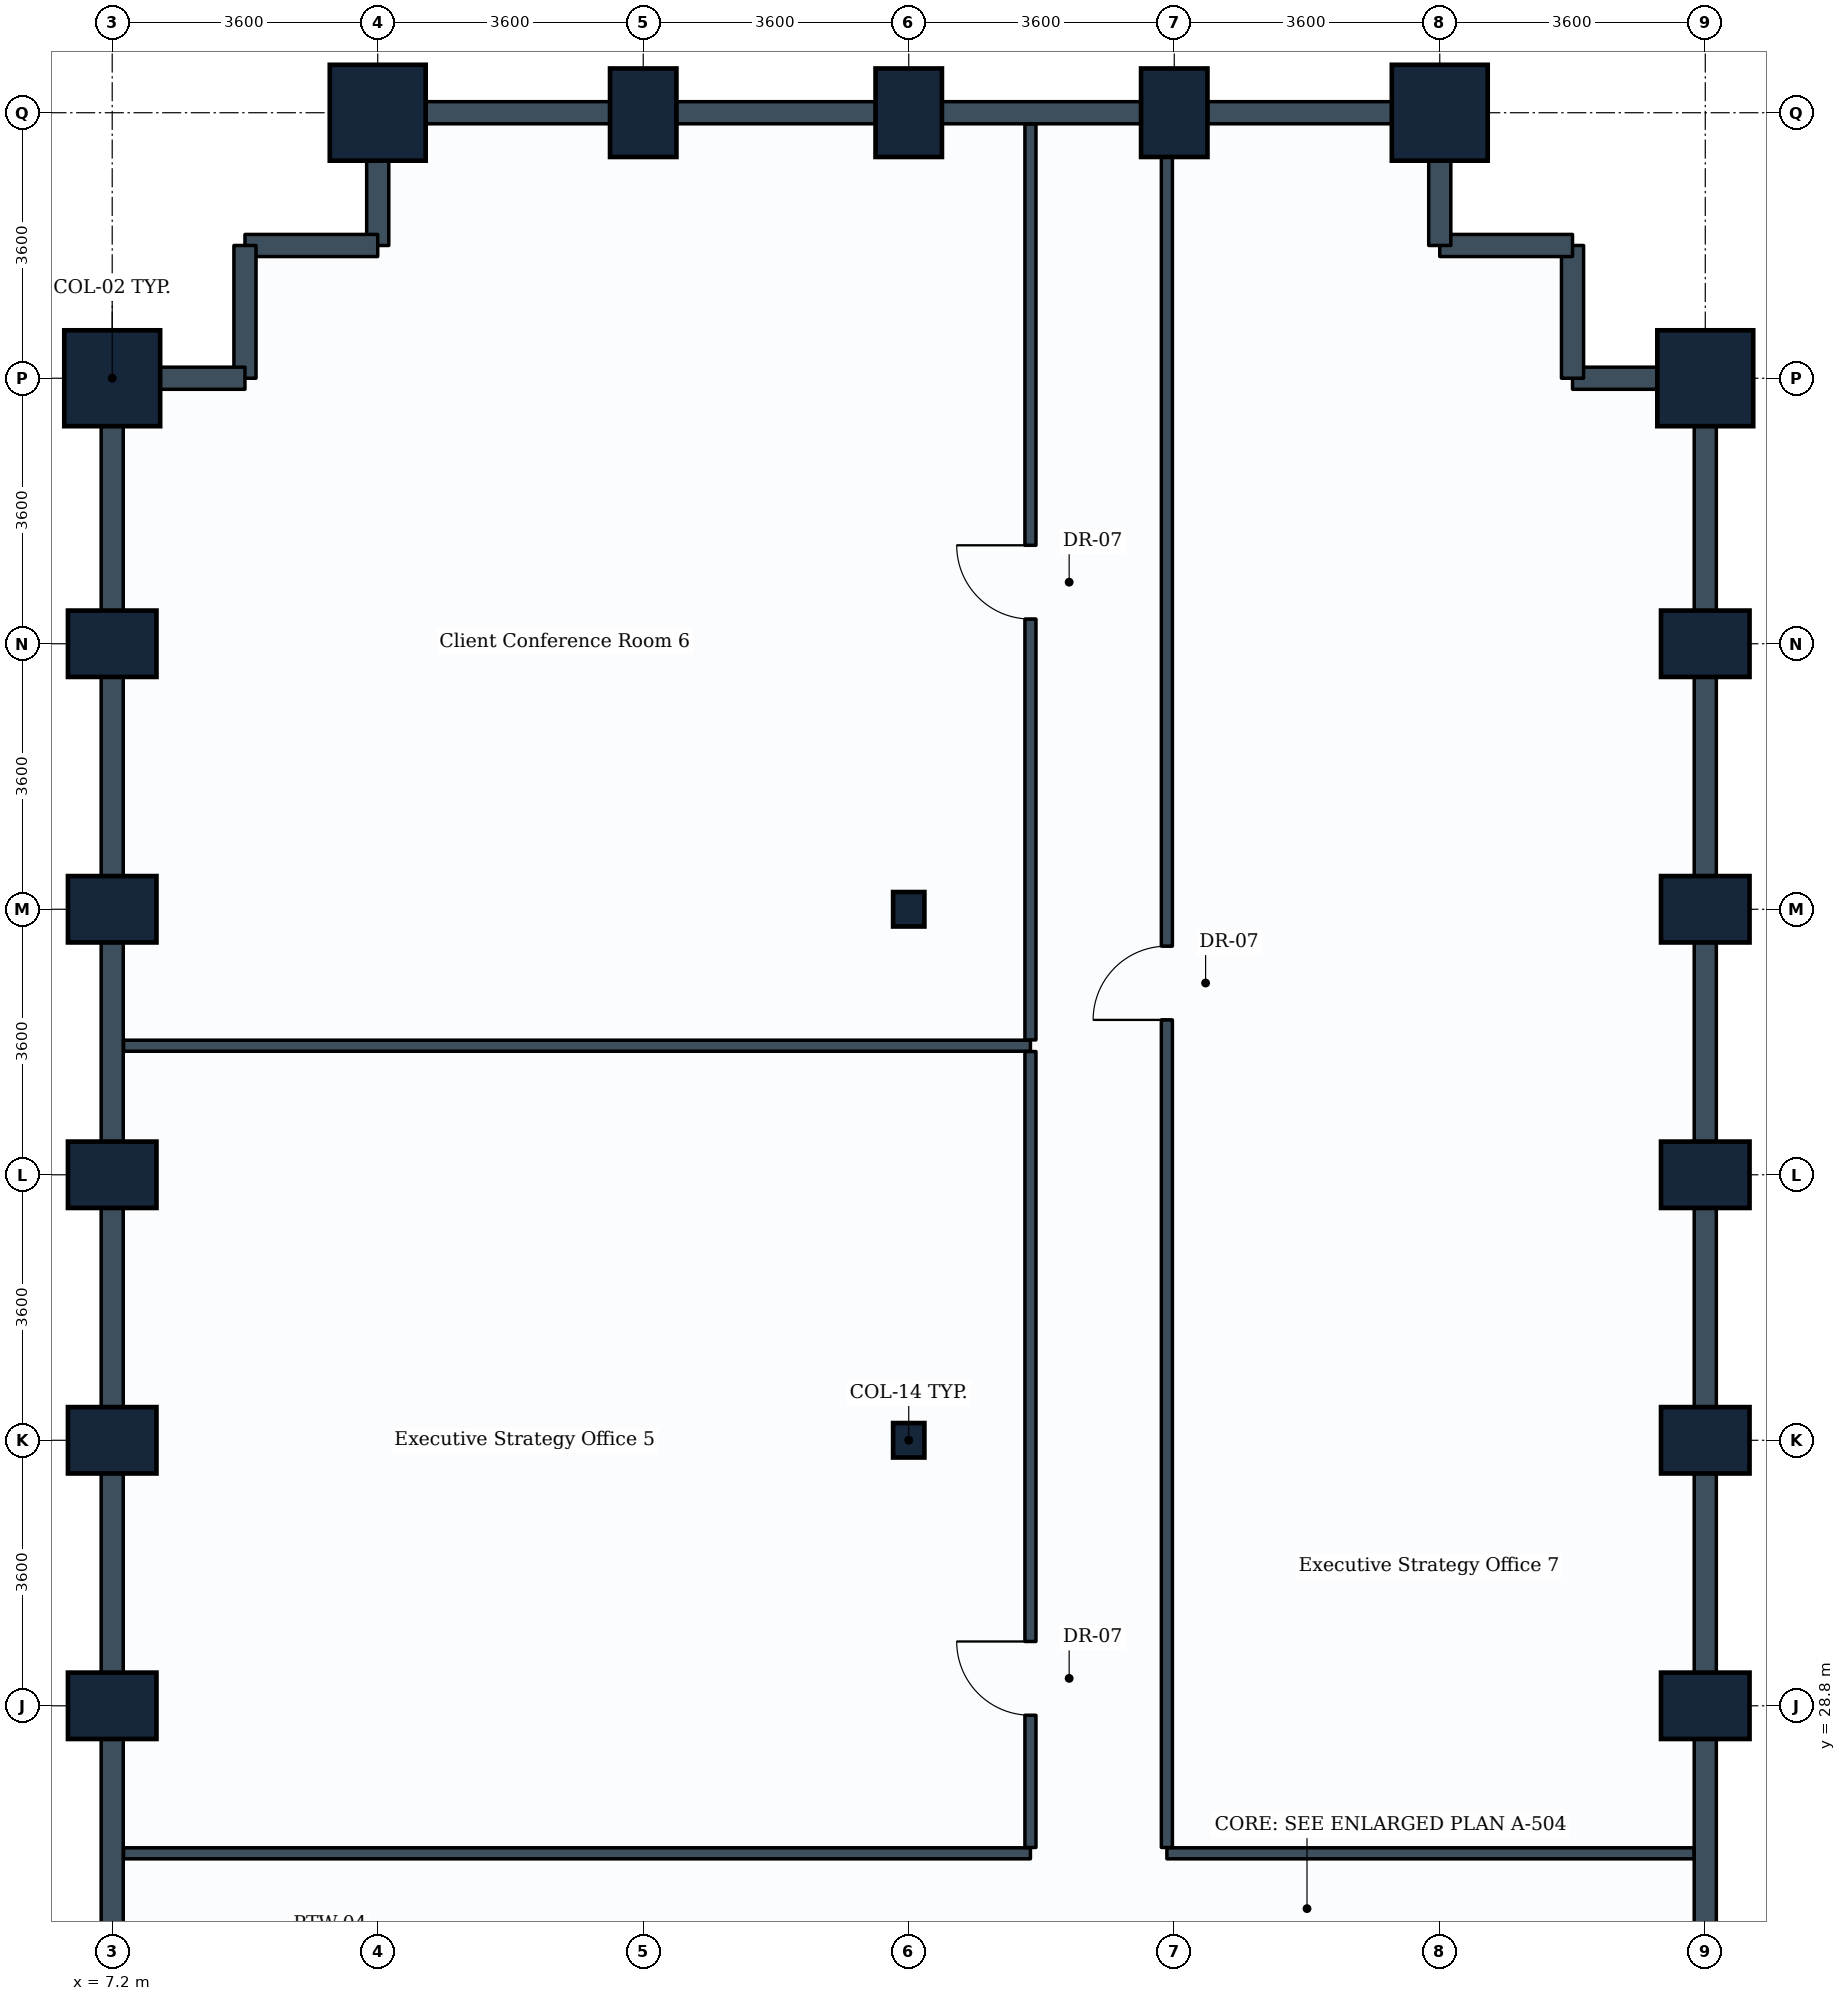
"""IFC4 building model, lengths in metres.
Left out: names, types, materials, properties, quantities, classifications, styles, units other than length and angle.
Written with IfcOpenShell. Run it as: python <this file> out.ifc"""

import sys

from ifc_helpers import new_model, si_unit, direction, frame, frame_2d, origin, origin_2d, place, context, subcontext, project, spatial, rectangle, i_section, extrude, element, fill, save


model = new_model("IFC4")
c1 = context("Model", 3, precision=1e-05, world=origin(), true_north=direction((0.0, 1.0)))
c2 = subcontext(c1, "Body", "Model", "MODEL_VIEW")
j1 = project(units=[si_unit("LENGTHUNIT", "METRE"), si_unit("PLANEANGLEUNIT", "RADIAN")], contexts=[c1])
p1 = place(None, origin())
s1 = spatial("IfcSite", under=j1, at=p1, CompositionType="ELEMENT")
p2 = place(p1, origin())
s2 = spatial("IfcBuilding", under=s1, at=p2, CompositionType="ELEMENT")
p3 = place(p2, frame((0.0, 0.0, 27.9)))
s3 = spatial("IfcBuildingStorey", under=s2, at=p3, CompositionType="ELEMENT", Elevation=27.9)
for number, where, z_axis, x_axis in (
    (1, (7.2, 28.8, 0.0), (0.0, 0.0, 1.0), (0.0, 1.0, 0.0)),
    (2, (7.2, 32.4, 0.0), (0.0, 0.0, 1.0), (0.0, 1.0, 0.0)),
    (3, (7.2, 36.0, 0.0), (0.0, 0.0, 1.0), (0.0, 1.0, 0.0)),
    (4, (7.2, 39.6, 0.0), (0.0, 0.0, 1.0), (0.0, 1.0, 0.0)),
    (5, (7.2, 43.2, 0.0), (0.0, 0.0, 1.0), (0.0, 1.0, 0.0)),
):
    element("IfcColumn", number, at=place(p3, frame(where, z_axis=z_axis, x_axis=x_axis)), inside=s3, PredefinedType="COLUMN", context=c2, shape_type="SweptSolid", body=[
        extrude(rectangle(XDim=0.9, YDim=1.2, at=origin_2d()), origin(), (0.0, 0.0, 1.0), 3.9),
    ])
for number, where, z_axis, x_axis in (
    (6, (7.2, 46.8, 0.0), (0.0, 0.0, 1.0), (0.0, 1.0, 0.0)),
    (7, (10.8, 50.4, 0.0), (0.0, 0.0, 1.0), (1.0, 0.0, 0.0)),
):
    element("IfcColumn", number, at=place(p3, frame(where, z_axis=z_axis, x_axis=x_axis)), inside=s3, PredefinedType="COLUMN", context=c2, shape_type="SweptSolid", body=[
        extrude(rectangle(XDim=1.3, YDim=1.3, at=origin_2d()), origin(), (0.0, 0.0, 1.0), 3.9),
    ])
p4 = place(p3, frame((14.4, 50.4, 0.0), z_axis=(0.0, 0.0, 1.0), x_axis=(1.0, 0.0, 0.0)))
e8 = element("IfcColumn", 8, at=p4, inside=s3, PredefinedType="COLUMN", context=c2, shape_type="SweptSolid", body=[
    extrude(rectangle(XDim=0.9, YDim=1.2, at=origin_2d()), origin(), (0.0, 0.0, 1.0), 3.9),
])
for number, where, z_axis, x_axis in (
    (9, (18.0, 32.4, 0.0), (0.0, 0.0, 1.0), (1.0, 0.0, 0.0)),
    (10, (18.0, 39.6, 0.0), (0.0, 0.0, 1.0), (1.0, 0.0, 0.0)),
):
    element("IfcColumn", number, at=place(p3, frame(where, z_axis=z_axis, x_axis=x_axis)), inside=s3, PredefinedType="COLUMN", context=c2, shape_type="SweptSolid", body=[
        extrude(i_section(OverallWidth=0.424, OverallDepth=0.467, WebThickness=0.033, FlangeThickness=0.053, FilletRadius=0.015, at=origin_2d()), origin(), (0.0, 0.0, 1.0), 3.9),
    ])
for number, where, z_axis, x_axis in (
    (11, (18.0, 50.4, 0.0), (0.0, 0.0, 1.0), (1.0, 0.0, 0.0)),
    (12, (21.6, 50.4, 0.0), (0.0, 0.0, 1.0), (1.0, 0.0, 0.0)),
):
    element("IfcColumn", number, at=place(p3, frame(where, z_axis=z_axis, x_axis=x_axis)), inside=s3, PredefinedType="COLUMN", context=c2, shape_type="SweptSolid", body=[
        extrude(rectangle(XDim=0.9, YDim=1.2, at=origin_2d()), origin(), (0.0, 0.0, 1.0), 3.9),
    ])
p5 = place(p3, frame((25.2, 50.4, 0.0), z_axis=(0.0, 0.0, 1.0), x_axis=(1.0, 0.0, 0.0)))
e13 = element("IfcColumn", 13, at=p5, inside=s3, PredefinedType="COLUMN", context=c2, shape_type="SweptSolid", body=[
    extrude(rectangle(XDim=1.3, YDim=1.3, at=origin_2d()), origin(), (0.0, 0.0, 1.0), 3.9),
])
for number, where, z_axis, x_axis in (
    (14, (28.8, 28.8, 0.0), (0.0, 0.0, 1.0), (0.0, 1.0, 0.0)),
    (15, (28.8, 32.4, 0.0), (0.0, 0.0, 1.0), (0.0, 1.0, 0.0)),
    (16, (28.8, 36.0, 0.0), (0.0, 0.0, 1.0), (0.0, 1.0, 0.0)),
    (17, (28.8, 39.6, 0.0), (0.0, 0.0, 1.0), (0.0, 1.0, 0.0)),
    (18, (28.8, 43.2, 0.0), (0.0, 0.0, 1.0), (0.0, 1.0, 0.0)),
):
    element("IfcColumn", number, at=place(p3, frame(where, z_axis=z_axis, x_axis=x_axis)), inside=s3, PredefinedType="COLUMN", context=c2, shape_type="SweptSolid", body=[
        extrude(rectangle(XDim=0.9, YDim=1.2, at=origin_2d()), origin(), (0.0, 0.0, 1.0), 3.9),
    ])
p6 = place(p3, frame((28.8, 46.8, 0.0), z_axis=(0.0, 0.0, 1.0), x_axis=(0.0, 1.0, 0.0)))
e19 = element("IfcColumn", 19, at=p6, inside=s3, PredefinedType="COLUMN", context=c2, shape_type="SweptSolid", body=[
    extrude(rectangle(XDim=1.3, YDim=1.3, at=origin_2d()), origin(), (0.0, 0.0, 1.0), 3.9),
])
p7 = place(p3, frame((28.8, 25.2, 0.0), z_axis=(0.0, 0.0, 1.0), x_axis=(0.0, 1.0, 0.0)))
e20 = element("IfcWall", 20, at=p7, inside=s3, PredefinedType="STANDARD", context=c2, shape_type="SweptSolid", body=[
    extrude(rectangle(XDim=3.6, YDim=0.3, at=frame_2d((1.8, 0.0))), origin(), (0.0, 0.0, 1.0), 3.14),
])
p8 = place(p3, frame((28.8, 28.8, 0.0), z_axis=(0.0, 0.0, 1.0), x_axis=(0.0, 1.0, 0.0)))
e21 = element("IfcWall", 21, at=p8, inside=s3, PredefinedType="STANDARD", context=c2, shape_type="SweptSolid", body=[
    extrude(rectangle(XDim=3.6, YDim=0.3, at=frame_2d((1.8, 0.0))), origin(), (0.0, 0.0, 1.0), 2.93),
])
for number, where, z_axis, x_axis in (
    (22, (28.8, 32.4, 0.0), (0.0, 0.0, 1.0), (0.0, 1.0, 0.0)),
    (23, (28.8, 36.0, 0.0), (0.0, 0.0, 1.0), (0.0, 1.0, 0.0)),
):
    element("IfcWall", number, at=place(p3, frame(where, z_axis=z_axis, x_axis=x_axis)), inside=s3, PredefinedType="STANDARD", context=c2, shape_type="SweptSolid", body=[
        extrude(rectangle(XDim=3.6, YDim=0.3, at=frame_2d((1.8, 0.0))), origin(), (0.0, 0.0, 1.0), 2.93),
    ])
p9 = place(p3, frame((28.8, 39.6, 0.0), z_axis=(0.0, 0.0, 1.0), x_axis=(0.0, 1.0, 0.0)))
e24 = element("IfcWall", 24, at=p9, inside=s3, PredefinedType="STANDARD", context=c2, shape_type="SweptSolid", body=[
    extrude(rectangle(XDim=3.6, YDim=0.3, at=frame_2d((1.8, 0.0))), origin(), (0.0, 0.0, 1.0), 2.93),
])
p10 = place(p3, frame((28.8, 43.2, 0.0), z_axis=(0.0, 0.0, 1.0), x_axis=(0.0, 1.0, 0.0)))
e25 = element("IfcWall", 25, at=p10, inside=s3, PredefinedType="STANDARD", context=c2, shape_type="SweptSolid", body=[
    extrude(rectangle(XDim=3.6, YDim=0.3, at=frame_2d((1.8, 0.0))), origin(), (0.0, 0.0, 1.0), 2.93),
])
p11 = place(p3, frame((27.0, 46.8, 0.0), z_axis=(0.0, 0.0, 1.0), x_axis=(1.0, 0.0, 0.0)))
e26 = element("IfcWall", 26, at=p11, inside=s3, PredefinedType="STANDARD", context=c2, shape_type="SweptSolid", body=[
    extrude(rectangle(XDim=1.8, YDim=0.3, at=frame_2d((0.9, 0.0))), origin(), (0.0, 0.0, 1.0), 2.93),
])
for number, where, z_axis, x_axis in (
    (27, (27.0, 46.8, 0.0), (0.0, 0.0, 1.0), (0.0, 1.0, 0.0)),
    (28, (25.2, 48.6, 0.0), (0.0, 0.0, 1.0), (1.0, 0.0, 0.0)),
):
    element("IfcWall", number, at=place(p3, frame(where, z_axis=z_axis, x_axis=x_axis)), inside=s3, PredefinedType="STANDARD", context=c2, shape_type="SweptSolid", body=[
        extrude(rectangle(XDim=1.8, YDim=0.3, at=frame_2d((0.9, 0.0))), origin(), (0.0, 0.0, 1.0), 3.635),
    ])
p12 = place(p3, frame((25.2, 48.6, 0.0), z_axis=(0.0, 0.0, 1.0), x_axis=(0.0, 1.0, 0.0)))
e29 = element("IfcWall", 29, at=p12, inside=s3, PredefinedType="STANDARD", context=c2, shape_type="SweptSolid", body=[
    extrude(rectangle(XDim=1.8, YDim=0.3, at=frame_2d((0.9, 0.0))), origin(), (0.0, 0.0, 1.0), 2.93),
])
p13 = place(p3, frame((21.6, 50.4, 0.0), z_axis=(0.0, 0.0, 1.0), x_axis=(1.0, 0.0, 0.0)))
e30 = element("IfcWall", 30, at=p13, inside=s3, PredefinedType="STANDARD", context=c2, shape_type="SweptSolid", body=[
    extrude(rectangle(XDim=3.6, YDim=0.3, at=frame_2d((1.8, 0.0))), origin(), (0.0, 0.0, 1.0), 2.93),
])
for number, where, z_axis, x_axis in (
    (31, (18.0, 50.4, 0.0), (0.0, 0.0, 1.0), (1.0, 0.0, 0.0)),
    (32, (14.4, 50.4, 0.0), (0.0, 0.0, 1.0), (1.0, 0.0, 0.0)),
):
    element("IfcWall", number, at=place(p3, frame(where, z_axis=z_axis, x_axis=x_axis)), inside=s3, PredefinedType="STANDARD", context=c2, shape_type="SweptSolid", body=[
        extrude(rectangle(XDim=3.6, YDim=0.3, at=frame_2d((1.8, 0.0))), origin(), (0.0, 0.0, 1.0), 2.93),
    ])
p14 = place(p3, frame((10.8, 50.4, 0.0), z_axis=(0.0, 0.0, 1.0), x_axis=(1.0, 0.0, 0.0)))
e33 = element("IfcWall", 33, at=p14, inside=s3, PredefinedType="STANDARD", context=c2, shape_type="SweptSolid", body=[
    extrude(rectangle(XDim=3.6, YDim=0.3, at=frame_2d((1.8, 0.0))), origin(), (0.0, 0.0, 1.0), 2.93),
])
p15 = place(p3, frame((10.8, 48.6, 0.0), z_axis=(0.0, 0.0, 1.0), x_axis=(0.0, 1.0, 0.0)))
e34 = element("IfcWall", 34, at=p15, inside=s3, PredefinedType="STANDARD", context=c2, shape_type="SweptSolid", body=[
    extrude(rectangle(XDim=1.8, YDim=0.3, at=frame_2d((0.9, 0.0))), origin(), (0.0, 0.0, 1.0), 2.93),
])
for number, where, z_axis, x_axis in (
    (35, (9.0, 48.6, 0.0), (0.0, 0.0, 1.0), (1.0, 0.0, 0.0)),
    (36, (9.0, 46.8, 0.0), (0.0, 0.0, 1.0), (0.0, 1.0, 0.0)),
):
    element("IfcWall", number, at=place(p3, frame(where, z_axis=z_axis, x_axis=x_axis)), inside=s3, PredefinedType="STANDARD", context=c2, shape_type="SweptSolid", body=[
        extrude(rectangle(XDim=1.8, YDim=0.3, at=frame_2d((0.9, 0.0))), origin(), (0.0, 0.0, 1.0), 3.635),
    ])
p16 = place(p3, frame((7.2, 46.8, 0.0), z_axis=(0.0, 0.0, 1.0), x_axis=(1.0, 0.0, 0.0)))
e37 = element("IfcWall", 37, at=p16, inside=s3, PredefinedType="STANDARD", context=c2, shape_type="SweptSolid", body=[
    extrude(rectangle(XDim=1.8, YDim=0.3, at=frame_2d((0.9, 0.0))), origin(), (0.0, 0.0, 1.0), 2.93),
])
p17 = place(p3, frame((7.2, 43.2, 0.0), z_axis=(0.0, 0.0, 1.0), x_axis=(0.0, 1.0, 0.0)))
e38 = element("IfcWall", 38, at=p17, inside=s3, PredefinedType="STANDARD", context=c2, shape_type="SweptSolid", body=[
    extrude(rectangle(XDim=3.6, YDim=0.3, at=frame_2d((1.8, 0.0))), origin(), (0.0, 0.0, 1.0), 2.93),
])
p18 = place(p3, frame((7.2, 39.6, 0.0), z_axis=(0.0, 0.0, 1.0), x_axis=(0.0, 1.0, 0.0)))
e39 = element("IfcWall", 39, at=p18, inside=s3, PredefinedType="STANDARD", context=c2, shape_type="SweptSolid", body=[
    extrude(rectangle(XDim=3.6, YDim=0.3, at=frame_2d((1.8, 0.0))), origin(), (0.0, 0.0, 1.0), 2.93),
])
for number, where, z_axis, x_axis in (
    (40, (7.2, 36.0, 0.0), (0.0, 0.0, 1.0), (0.0, 1.0, 0.0)),
    (41, (7.2, 32.4, 0.0), (0.0, 0.0, 1.0), (0.0, 1.0, 0.0)),
):
    element("IfcWall", number, at=place(p3, frame(where, z_axis=z_axis, x_axis=x_axis)), inside=s3, PredefinedType="STANDARD", context=c2, shape_type="SweptSolid", body=[
        extrude(rectangle(XDim=3.6, YDim=0.3, at=frame_2d((1.8, 0.0))), origin(), (0.0, 0.0, 1.0), 2.93),
    ])
p19 = place(p3, frame((7.2, 28.8, 0.0), z_axis=(0.0, 0.0, 1.0), x_axis=(0.0, 1.0, 0.0)))
e42 = element("IfcWall", 42, at=p19, inside=s3, PredefinedType="STANDARD", context=c2, shape_type="SweptSolid", body=[
    extrude(rectangle(XDim=3.6, YDim=0.3, at=frame_2d((1.8, 0.0))), origin(), (0.0, 0.0, 1.0), 2.93),
])
p20 = place(p3, frame((7.2, 25.2, 0.0), z_axis=(0.0, 0.0, 1.0), x_axis=(0.0, 1.0, 0.0)))
e43 = element("IfcWall", 43, at=p20, inside=s3, PredefinedType="STANDARD", context=c2, shape_type="SweptSolid", body=[
    extrude(rectangle(XDim=3.6, YDim=0.3, at=frame_2d((1.8, 0.0))), origin(), (0.0, 0.0, 1.0), 2.93),
])
for number, where, z_axis, x_axis in (
    (44, (7.354, 26.8, 0.0), (0.0, 0.0, 1.0), (1.0, 0.0, 0.0)),
    (45, (7.354, 37.75, 0.0), (0.0, 0.0, 1.0), (1.0, 0.0, 0.0)),
):
    element("IfcWall", number, at=place(p3, frame(where, z_axis=z_axis, x_axis=x_axis)), inside=s3, PredefinedType="PARTITIONING", context=c2, shape_type="SweptSolid", body=[
        extrude(rectangle(XDim=12.296, YDim=0.15, at=frame_2d((6.148, 0.0))), origin(), (0.0, 0.0, 1.0), 2.93),
    ])
p21 = place(p3, frame((19.65, 26.879, 0.0), z_axis=(0.0, 0.0, 1.0), x_axis=(0.0, 1.0, 0.0)))
e46 = element("IfcWall", 46, at=p21, inside=s3, PredefinedType="PARTITIONING", context=c2, shape_type="SweptSolid", body=[
    extrude(rectangle(XDim=10.792, YDim=0.15, at=frame_2d((5.396, 0.0))), origin(), (0.0, 0.0, 1.0), 3.08),
])
p22 = place(p21, frame((1.793, 0.0, 0.0)))
e47 = element("IfcOpeningElement", 47, at=p22, cuts=e46, PredefinedType="OPENING", context=c2, shape_type="SweptSolid", body=[
    extrude(rectangle(XDim=1.0, YDim=2.1, at=frame_2d((0.5, 1.05))), frame((0.0, 0.085, 0.0), z_axis=(0.0, -1.0, 0.0), x_axis=(1.0, 0.0, 0.0)), (0.0, 0.0, 1.0), 0.17),
])
p23 = place(p3, frame((19.65, 37.829, 0.0), z_axis=(0.0, 0.0, 1.0), x_axis=(0.0, 1.0, 0.0)))
e48 = element("IfcWall", 48, at=p23, inside=s3, PredefinedType="PARTITIONING", context=c2, shape_type="SweptSolid", body=[
    extrude(rectangle(XDim=12.417, YDim=0.15, at=frame_2d((6.208, 0.0))), origin(), (0.0, 0.0, 1.0), 2.93),
])
p24 = place(p23, frame((5.706, 0.0, 0.0)))
e49 = element("IfcOpeningElement", 49, at=p24, cuts=e48, PredefinedType="OPENING", context=c2, shape_type="SweptSolid", body=[
    extrude(rectangle(XDim=1.0, YDim=2.1, at=frame_2d((0.5, 1.05))), frame((0.0, 0.085, 0.0), z_axis=(0.0, -1.0, 0.0), x_axis=(1.0, 0.0, 0.0)), (0.0, 0.0, 1.0), 0.17),
])
p25 = place(p3, frame((21.5, 26.8, 0.0), z_axis=(0.0, 0.0, 1.0), x_axis=(1.0, 0.0, 0.0)))
e50 = element("IfcWall", 50, at=p25, inside=s3, PredefinedType="PARTITIONING", context=c2, shape_type="SweptSolid", body=[
    extrude(rectangle(XDim=7.146, YDim=0.15, at=frame_2d((3.573, 0.0))), origin(), (0.0, 0.0, 1.0), 3.635),
])
p26 = place(p3, frame((21.5, 26.879, 0.0), z_axis=(0.0, 0.0, 1.0), x_axis=(0.0, 1.0, 0.0)))
e51 = element("IfcWall", 51, at=p26, inside=s3, PredefinedType="PARTITIONING", context=c2, shape_type="SweptSolid", body=[
    extrude(rectangle(XDim=23.367, YDim=0.15, at=frame_2d((11.684, 0.0))), origin(), (0.0, 0.0, 1.0), 2.93),
])
p27 = place(p26, frame((11.221, 0.0, 0.0)))
e52 = element("IfcOpeningElement", 52, at=p27, cuts=e51, PredefinedType="OPENING", context=c2, shape_type="SweptSolid", body=[
    extrude(rectangle(XDim=1.0, YDim=2.1, at=frame_2d((0.5, 1.05))), frame((0.0, 0.085, 0.0), z_axis=(0.0, -1.0, 0.0), x_axis=(1.0, 0.0, 0.0)), (0.0, 0.0, 1.0), 0.17),
])
p28 = place(p22, origin())
e53 = element("IfcDoor", 53, at=p28, inside=s3, OperationType="SINGLE_SWING_RIGHT", PredefinedType="DOOR", context=c2, shape_type="SweptSolid", body=[
    extrude(rectangle(XDim=1.0, YDim=2.1, at=frame_2d((0.5, 1.05))), frame((0.0, 0.025, 0.0), z_axis=(0.0, -1.0, 0.0), x_axis=(1.0, 0.0, 0.0)), (0.0, 0.0, 1.0), 0.05),
])
fill(e47, e53)
p29 = place(p24, origin())
e54 = element("IfcDoor", 54, at=p29, inside=s3, OperationType="SINGLE_SWING_RIGHT", PredefinedType="DOOR", context=c2, shape_type="SweptSolid", body=[
    extrude(rectangle(XDim=1.0, YDim=2.1, at=frame_2d((0.5, 1.05))), frame((0.0, 0.025, 0.0), z_axis=(0.0, -1.0, 0.0), x_axis=(1.0, 0.0, 0.0)), (0.0, 0.0, 1.0), 0.05),
])
fill(e49, e54)
p30 = place(p27, origin())
e55 = element("IfcDoor", 55, at=p30, inside=s3, OperationType="SINGLE_SWING_LEFT", PredefinedType="DOOR", context=c2, shape_type="SweptSolid", body=[
    extrude(rectangle(XDim=1.0, YDim=2.1, at=frame_2d((0.5, 1.05))), frame((0.0, 0.025, 0.0), z_axis=(0.0, -1.0, 0.0), x_axis=(1.0, 0.0, 0.0)), (0.0, 0.0, 1.0), 0.05),
])
fill(e52, e55)
save(model, sys.argv[1])
